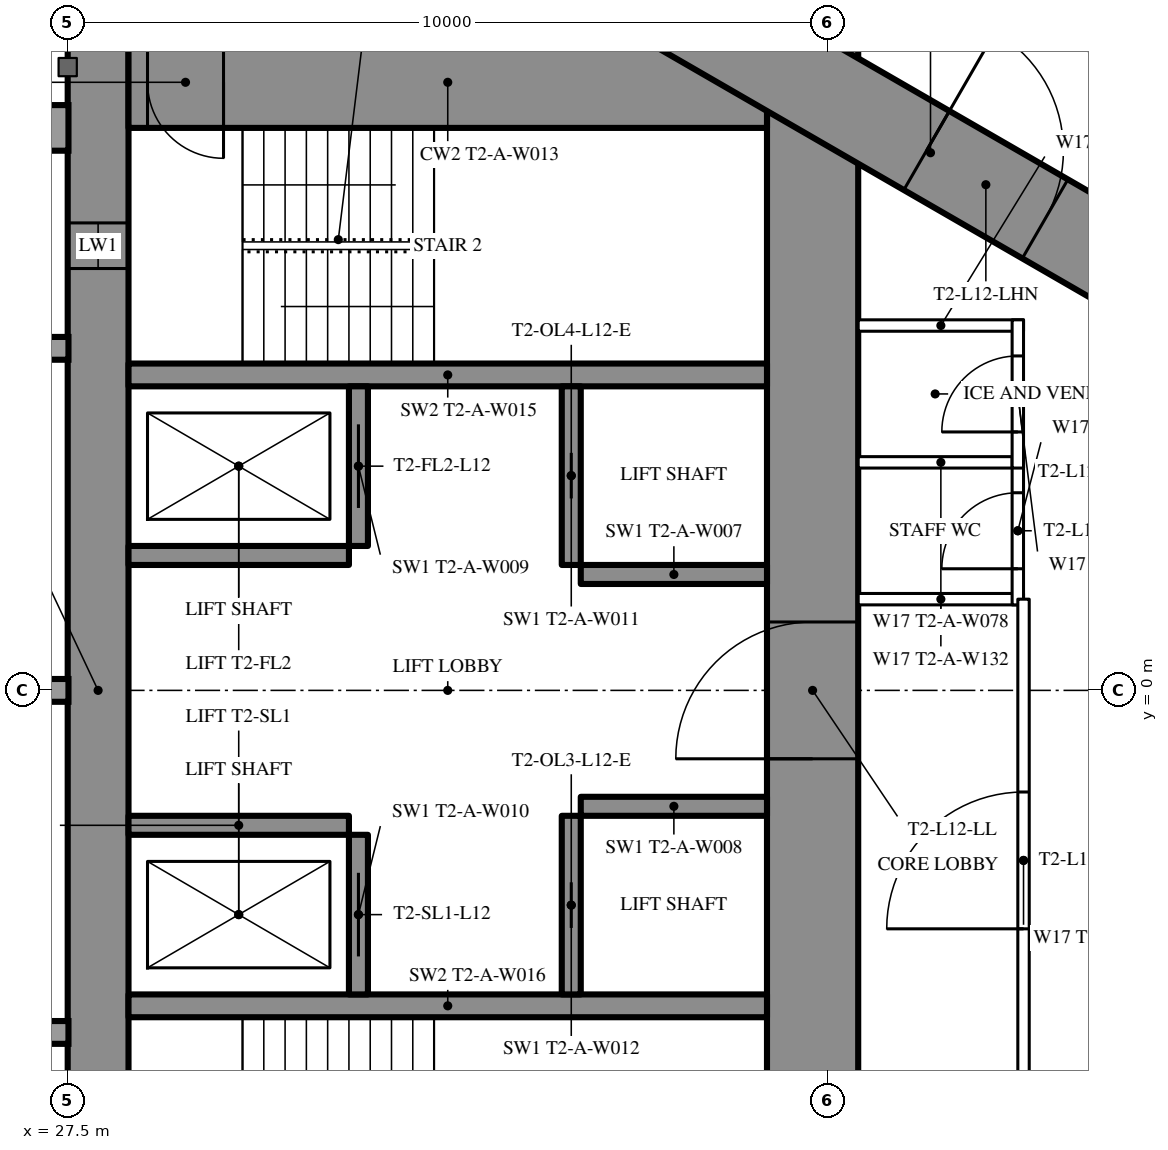
"""IFC4 building model, lengths in metres.
Left out: names, types, materials, properties, quantities, classifications, styles, units other than length and angle.
Written with IfcOpenShell. Run it as: python <this file> out.ifc"""

import sys

from ifc_helpers import new_model, si_unit, direction, frame, frame_2d, origin, place, context, subcontext, project, spatial, rectangle, extrude, element, fill, save


model = new_model("IFC4")
c1 = context("Model", 3, precision=1e-05, world=origin(), true_north=direction((0.0, 1.0)))
c2 = subcontext(c1, "Body", "Model", "MODEL_VIEW")
j1 = project(units=[si_unit("LENGTHUNIT", "METRE"), si_unit("PLANEANGLEUNIT", "RADIAN")], contexts=[c1])
p1 = place(None, origin())
s1 = spatial("IfcSite", under=j1, at=p1, CompositionType="ELEMENT")
p2 = place(p1, origin())
s2 = spatial("IfcBuilding", under=s1, at=p2, CompositionType="ELEMENT")
p3 = place(p2, frame((0.0, 0.0, 49.5)))
s3 = spatial("IfcBuildingStorey", under=s2, at=p3, CompositionType="ELEMENT", Elevation=49.5)
p4 = place(p3, frame((27.9, -8.6, 0.0), z_axis=(0.0, 0.0, 1.0), x_axis=(0.0, 1.0, 0.0)))
e1 = element("IfcWall", 1, at=p4, inside=s3, PredefinedType="SHEAR", context=c2, shape_type="SweptSolid", body=[
    extrude(rectangle(XDim=17.2, YDim=0.8, at=frame_2d((8.6, 0.0))), origin(), (0.0, 0.0, 1.0), 3.5),
])
p5 = place(p4, frame((2.45, 0.0, 0.6)))
e2 = element("IfcOpeningElement", 2, at=p5, cuts=e1, PredefinedType="OPENING", context=c2, shape_type="SweptSolid", body=[
    extrude(rectangle(XDim=0.6, YDim=2.1, at=frame_2d((0.3, 1.05))), frame((0.0, 0.41, 0.0), z_axis=(0.0, -1.0, 0.0), x_axis=(1.0, 0.0, 0.0)), (0.0, 0.0, 1.0), 0.82),
])
p6 = place(p4, frame((14.15, 0.0, 0.6)))
e3 = element("IfcOpeningElement", 3, at=p6, cuts=e1, PredefinedType="OPENING", context=c2, shape_type="SweptSolid", body=[
    extrude(rectangle(XDim=0.6, YDim=2.1, at=frame_2d((0.3, 1.05))), frame((0.0, 0.41, 0.0), z_axis=(0.0, -1.0, 0.0), x_axis=(1.0, 0.0, 0.0)), (0.0, 0.0, 1.0), 0.82),
])
p7 = place(p3, frame((37.3, -8.6, 0.0), z_axis=(0.0, 0.0, 1.0), x_axis=(0.0, 1.0, 0.0)))
e4 = element("IfcWall", 4, at=p7, inside=s3, PredefinedType="SHEAR", context=c2, shape_type="SweptSolid", body=[
    extrude(rectangle(XDim=17.2, YDim=1.2, at=frame_2d((8.6, 0.0))), origin(), (0.0, 0.0, 1.0), 3.5),
])
p8 = place(p7, frame((7.7, 0.0, 0.0)))
e5 = element("IfcOpeningElement", 5, at=p8, cuts=e4, PredefinedType="OPENING", context=c2, shape_type="SweptSolid", body=[
    extrude(rectangle(XDim=1.8, YDim=2.2, at=frame_2d((0.9, 1.1))), frame((0.0, 0.61, 0.0), z_axis=(0.0, -1.0, 0.0), x_axis=(1.0, 0.0, 0.0)), (0.0, 0.0, 1.0), 1.22),
])
p9 = place(p3, frame((28.3, 8.0, 0.0), z_axis=(0.0, 0.0, 1.0), x_axis=(1.0, 0.0, 0.0)))
e6 = element("IfcWall", 6, at=p9, inside=s3, PredefinedType="SHEAR", context=c2, shape_type="SweptSolid", body=[
    extrude(rectangle(XDim=8.4, YDim=1.2, at=frame_2d((4.2, 0.0))), origin(), (0.0, 0.0, 1.0), 3.5),
])
p10 = place(p9, frame((0.25, 0.0, 0.0)))
e7 = element("IfcOpeningElement", 7, at=p10, cuts=e6, PredefinedType="OPENING", context=c2, shape_type="SweptSolid", body=[
    extrude(rectangle(XDim=1.0, YDim=2.2, at=frame_2d((0.5, 1.1))), frame((0.0, 0.61, 0.0), z_axis=(0.0, -1.0, 0.0), x_axis=(1.0, 0.0, 0.0)), (0.0, 0.0, 1.0), 1.22),
])
for number, where, z_axis, x_axis in (
    (8, (28.3, -4.15, 0.0), (0.0, 0.0, 1.0), (1.0, 0.0, 0.0)),
    (9, (28.3, 4.15, 0.0), (0.0, 0.0, 1.0), (1.0, 0.0, 0.0)),
):
    element("IfcWall", number, at=place(p3, frame(where, z_axis=z_axis, x_axis=x_axis)), inside=s3, PredefinedType="SHEAR", context=c2, shape_type="SweptSolid", body=[
        extrude(rectangle(XDim=8.4, YDim=0.3, at=frame_2d((4.2, 0.0))), origin(), (0.0, 0.0, 1.0), 3.5),
    ])
p11 = place(p3, frame((31.325, -4.0, 0.0), z_axis=(0.0, 0.0, 1.0), x_axis=(0.0, 1.0, 0.0)))
e10 = element("IfcWall", 10, at=p11, inside=s3, PredefinedType="SHEAR", context=c2, shape_type="SweptSolid", body=[
    extrude(rectangle(XDim=2.1, YDim=0.25, at=frame_2d((1.05, 0.0))), origin(), (0.0, 0.0, 1.0), 3.5),
])
p12 = place(p11, frame((0.5, 0.0, 0.0)))
e11 = element("IfcOpeningElement", 11, at=p12, cuts=e10, PredefinedType="OPENING", context=c2, shape_type="SweptSolid", body=[
    extrude(rectangle(XDim=1.1, YDim=2.2, at=frame_2d((0.55, 1.1))), frame((0.0, 0.135, 0.0), z_axis=(0.0, -1.0, 0.0), x_axis=(1.0, 0.0, 0.0)), (0.0, 0.0, 1.0), 0.27),
])
p13 = place(p3, frame((34.125, -4.0, 0.0), z_axis=(0.0, 0.0, 1.0), x_axis=(0.0, 1.0, 0.0)))
e12 = element("IfcWall", 12, at=p13, inside=s3, PredefinedType="SHEAR", context=c2, shape_type="SweptSolid", body=[
    extrude(rectangle(XDim=2.35, YDim=0.25, at=frame_2d((1.175, 0.0))), origin(), (0.0, 0.0, 1.0), 3.5),
])
p14 = place(p13, frame((0.875, 0.0, 0.0)))
e13 = element("IfcOpeningElement", 13, at=p14, cuts=e12, PredefinedType="OPENING", context=c2, shape_type="SweptSolid", body=[
    extrude(rectangle(XDim=0.6, YDim=2.0, at=frame_2d((0.3, 1.0))), frame((0.0, 0.135, 0.0), z_axis=(0.0, -1.0, 0.0), x_axis=(1.0, 0.0, 0.0)), (0.0, 0.0, 1.0), 0.27),
])
p15 = place(p3, frame((28.3, -1.775, 0.0), z_axis=(0.0, 0.0, 1.0), x_axis=(1.0, 0.0, 0.0)))
e14 = element("IfcWall", 14, at=p15, inside=s3, PredefinedType="SHEAR", context=c2, shape_type="SweptSolid", body=[
    extrude(rectangle(XDim=2.9, YDim=0.25, at=frame_2d((1.45, 0.0))), origin(), (0.0, 0.0, 1.0), 3.5),
])
p16 = place(p3, frame((34.25, -1.525, 0.0), z_axis=(0.0, 0.0, 1.0), x_axis=(1.0, 0.0, 0.0)))
e15 = element("IfcWall", 15, at=p16, inside=s3, PredefinedType="SHEAR", context=c2, shape_type="SweptSolid", body=[
    extrude(rectangle(XDim=2.45, YDim=0.25, at=frame_2d((1.225, 0.0))), origin(), (0.0, 0.0, 1.0), 3.5),
])
p17 = place(p3, frame((31.325, 1.9, 0.0), z_axis=(0.0, 0.0, 1.0), x_axis=(0.0, 1.0, 0.0)))
e16 = element("IfcWall", 16, at=p17, inside=s3, PredefinedType="SHEAR", context=c2, shape_type="SweptSolid", body=[
    extrude(rectangle(XDim=2.1, YDim=0.25, at=frame_2d((1.05, 0.0))), origin(), (0.0, 0.0, 1.0), 3.5),
])
p18 = place(p17, frame((0.5, 0.0, 0.0)))
e17 = element("IfcOpeningElement", 17, at=p18, cuts=e16, PredefinedType="OPENING", context=c2, shape_type="SweptSolid", body=[
    extrude(rectangle(XDim=1.1, YDim=2.2, at=frame_2d((0.55, 1.1))), frame((0.0, 0.135, 0.0), z_axis=(0.0, -1.0, 0.0), x_axis=(1.0, 0.0, 0.0)), (0.0, 0.0, 1.0), 0.27),
])
p19 = place(p3, frame((34.125, 1.65, 0.0), z_axis=(0.0, 0.0, 1.0), x_axis=(0.0, 1.0, 0.0)))
e18 = element("IfcWall", 18, at=p19, inside=s3, PredefinedType="SHEAR", context=c2, shape_type="SweptSolid", body=[
    extrude(rectangle(XDim=2.35, YDim=0.25, at=frame_2d((1.175, 0.0))), origin(), (0.0, 0.0, 1.0), 3.5),
])
p20 = place(p19, frame((0.875, 0.0, 0.0)))
e19 = element("IfcOpeningElement", 19, at=p20, cuts=e18, PredefinedType="OPENING", context=c2, shape_type="SweptSolid", body=[
    extrude(rectangle(XDim=0.6, YDim=2.0, at=frame_2d((0.3, 1.0))), frame((0.0, 0.135, 0.0), z_axis=(0.0, -1.0, 0.0), x_axis=(1.0, 0.0, 0.0)), (0.0, 0.0, 1.0), 0.27),
])
p21 = place(p3, frame((28.3, 1.775, 0.0), z_axis=(0.0, 0.0, 1.0), x_axis=(1.0, 0.0, 0.0)))
e20 = element("IfcWall", 20, at=p21, inside=s3, PredefinedType="SHEAR", context=c2, shape_type="SweptSolid", body=[
    extrude(rectangle(XDim=2.9, YDim=0.25, at=frame_2d((1.45, 0.0))), origin(), (0.0, 0.0, 1.0), 3.5),
])
p22 = place(p3, frame((34.25, 1.525, 0.0), z_axis=(0.0, 0.0, 1.0), x_axis=(1.0, 0.0, 0.0)))
e21 = element("IfcWall", 21, at=p22, inside=s3, PredefinedType="SHEAR", context=c2, shape_type="SweptSolid", body=[
    extrude(rectangle(XDim=2.45, YDim=0.25, at=frame_2d((1.225, 0.0))), origin(), (0.0, 0.0, 1.0), 3.5),
])
p23 = place(p3, frame((27.2, -13.8, 0.0), z_axis=(0.0, 0.0, 1.0), x_axis=(0.866027159892, 0.499996958321, 0.0)))
e22 = element("IfcWall", 22, at=p23, inside=s3, PredefinedType="SHEAR", context=c2, shape_type="SweptSolid", body=[
    extrude(rectangle(XDim=27.947, YDim=1.2, at=frame_2d((13.973, 0.0))), origin(), (0.0, 0.0, 1.0), 3.5),
])
p24 = place(p23, frame((4.6, 0.0, 0.0)))
e23 = element("IfcOpeningElement", 23, at=p24, cuts=e22, PredefinedType="OPENING", context=c2, shape_type="SweptSolid", body=[
    extrude(rectangle(XDim=1.0, YDim=2.2, at=frame_2d((0.5, 1.1))), frame((0.0, 0.61, 0.0), z_axis=(0.0, -1.0, 0.0), x_axis=(1.0, 0.0, 0.0)), (0.0, 0.0, 1.0), 1.22),
])
p25 = place(p23, frame((13.395, 0.0, 0.0)))
e24 = element("IfcOpeningElement", 24, at=p25, cuts=e22, PredefinedType="OPENING", context=c2, shape_type="SweptSolid", body=[
    extrude(rectangle(XDim=1.8, YDim=2.2, at=frame_2d((0.9, 1.1))), frame((0.0, 0.61, 0.0), z_axis=(0.0, -1.0, 0.0), x_axis=(1.0, 0.0, 0.0)), (0.0, 0.0, 1.0), 1.22),
])
p26 = place(p3, frame((27.2, 13.8, 0.0), z_axis=(0.0, 0.0, 1.0), x_axis=(0.866024515034, -0.500001539357, 0.0)))
e25 = element("IfcWall", 25, at=p26, inside=s3, PredefinedType="SHEAR", context=c2, shape_type="SweptSolid", body=[
    extrude(rectangle(XDim=26.907, YDim=1.2, at=frame_2d((13.454, 0.0))), origin(), (0.0, 0.0, 1.0), 3.5),
])
p27 = place(p26, frame((4.6, 0.0, 0.0)))
e26 = element("IfcOpeningElement", 26, at=p27, cuts=e25, PredefinedType="OPENING", context=c2, shape_type="SweptSolid", body=[
    extrude(rectangle(XDim=1.0, YDim=2.2, at=frame_2d((0.5, 1.1))), frame((0.0, 0.61, 0.0), z_axis=(0.0, -1.0, 0.0), x_axis=(1.0, 0.0, 0.0)), (0.0, 0.0, 1.0), 1.22),
])
p28 = place(p26, frame((13.395, 0.0, 0.0)))
e27 = element("IfcOpeningElement", 27, at=p28, cuts=e25, PredefinedType="OPENING", context=c2, shape_type="SweptSolid", body=[
    extrude(rectangle(XDim=1.8, YDim=2.2, at=frame_2d((0.9, 1.1))), frame((0.0, 0.61, 0.0), z_axis=(0.0, -1.0, 0.0), x_axis=(1.0, 0.0, 0.0)), (0.0, 0.0, 1.0), 1.22),
])
p29 = place(p3, frame((37.96, -10.243, 0.0), z_axis=(0.0, 0.0, 1.0), x_axis=(0.866026429433, 0.499998223521, 0.0)))
e28 = element("IfcWall", 28, at=p29, inside=s3, PredefinedType="PARTITIONING", context=c2, shape_type="SweptSolid", body=[
    extrude(rectangle(XDim=20.487, YDim=0.2, at=frame_2d((10.243, 0.0))), origin(), (0.0, 0.0, 1.0), 3.25),
])
p30 = place(p29, frame((6.925, 0.0, 0.0)))
e29 = element("IfcOpeningElement", 29, at=p30, cuts=e28, PredefinedType="OPENING", context=c2, shape_type="SweptSolid", body=[
    extrude(rectangle(XDim=0.95, YDim=2.2, at=frame_2d((0.475, 1.1))), frame((0.0, 0.11, 0.0), z_axis=(0.0, -1.0, 0.0), x_axis=(1.0, 0.0, 0.0)), (0.0, 0.0, 1.0), 0.22),
])
p31 = place(p29, frame((11.549, 0.0, 0.0)))
e30 = element("IfcOpeningElement", 30, at=p31, cuts=e28, PredefinedType="OPENING", context=c2, shape_type="SweptSolid", body=[
    extrude(rectangle(XDim=0.95, YDim=2.2, at=frame_2d((0.475, 1.1))), frame((0.0, 0.11, 0.0), z_axis=(0.0, -1.0, 0.0), x_axis=(1.0, 0.0, 0.0)), (0.0, 0.0, 1.0), 0.22),
])
p32 = place(p29, frame((13.249, 0.0, 0.0)))
e31 = element("IfcOpeningElement", 31, at=p32, cuts=e28, PredefinedType="OPENING", context=c2, shape_type="SweptSolid", body=[
    extrude(rectangle(XDim=0.95, YDim=2.2, at=frame_2d((0.475, 1.1))), frame((0.0, 0.11, 0.0), z_axis=(0.0, -1.0, 0.0), x_axis=(1.0, 0.0, 0.0)), (0.0, 0.0, 1.0), 0.22),
])
p33 = place(p29, frame((17.585, 0.0, 0.0)))
e32 = element("IfcOpeningElement", 32, at=p33, cuts=e28, PredefinedType="OPENING", context=c2, shape_type="SweptSolid", body=[
    extrude(rectangle(XDim=0.95, YDim=2.2, at=frame_2d((0.475, 1.1))), frame((0.0, 0.11, 0.0), z_axis=(0.0, -1.0, 0.0), x_axis=(1.0, 0.0, 0.0)), (0.0, 0.0, 1.0), 0.22),
])
p34 = place(p29, frame((0.6, 0.0, 0.0)))
e33 = element("IfcOpeningElement", 33, at=p34, cuts=e28, PredefinedType="OPENING", context=c2, shape_type="SweptSolid", body=[
    extrude(rectangle(XDim=0.95, YDim=2.2, at=frame_2d((0.475, 1.1))), frame((0.0, 0.11, 0.0), z_axis=(0.0, -1.0, 0.0), x_axis=(1.0, 0.0, 0.0)), (0.0, 0.0, 1.0), 0.22),
])
p35 = place(p3, frame((36.834, 10.894, 0.0), z_axis=(0.0, 0.0, 1.0), x_axis=(0.866031136856, -0.499990069898, 0.0)))
e34 = element("IfcWall", 34, at=p35, inside=s3, PredefinedType="PARTITIONING", context=c2, shape_type="SweptSolid", body=[
    extrude(rectangle(XDim=5.475, YDim=0.2, at=frame_2d((2.738, 0.0))), origin(), (0.0, 0.0, 1.0), 3.25),
])
p36 = place(p35, frame((1.542, 0.0, 0.0)))
e35 = element("IfcOpeningElement", 35, at=p36, cuts=e34, PredefinedType="OPENING", context=c2, shape_type="SweptSolid", body=[
    extrude(rectangle(XDim=0.95, YDim=2.2, at=frame_2d((0.475, 1.1))), frame((0.0, 0.11, 0.0), z_axis=(0.0, -1.0, 0.0), x_axis=(1.0, 0.0, 0.0)), (0.0, 0.0, 1.0), 0.22),
])
p37 = place(p35, frame((0.246, 0.0, 0.0)))
e36 = element("IfcOpeningElement", 36, at=p37, cuts=e34, PredefinedType="OPENING", context=c2, shape_type="SweptSolid", body=[
    extrude(rectangle(XDim=0.9, YDim=2.2, at=frame_2d((0.45, 1.1))), frame((0.0, 0.11, 0.0), z_axis=(0.0, -1.0, 0.0), x_axis=(1.0, 0.0, 0.0)), (0.0, 0.0, 1.0), 0.22),
])
for number, where, z_axis, x_axis in (
    (37, (37.9, 1.2, 0.0), (0.0, 0.0, 1.0), (1.0, 0.0, 0.0)),
    (38, (37.9, 3.0, 0.0), (0.0, 0.0, 1.0), (1.0, 0.0, 0.0)),
    (39, (37.9, 4.8, 0.0), (0.0, 0.0, 1.0), (1.0, 0.0, 0.0)),
):
    element("IfcWall", number, at=place(p3, frame(where, z_axis=z_axis, x_axis=x_axis)), inside=s3, PredefinedType="PARTITIONING", context=c2, shape_type="SweptSolid", body=[
        extrude(rectangle(XDim=2.175, YDim=0.15, at=frame_2d((1.087, 0.0))), origin(), (0.0, 0.0, 1.0), 3.25),
    ])
p38 = place(p3, frame((40.0, 1.125, 0.0), z_axis=(0.0, 0.0, 1.0), x_axis=(0.0, 1.0, 0.0)))
e40 = element("IfcWall", 40, at=p38, inside=s3, PredefinedType="PARTITIONING", context=c2, shape_type="SweptSolid", body=[
    extrude(rectangle(XDim=1.95, YDim=0.15, at=frame_2d((0.975, 0.0))), origin(), (0.0, 0.0, 1.0), 3.25),
])
p39 = place(p38, frame((0.475, 0.0, 0.0)))
e41 = element("IfcOpeningElement", 41, at=p39, cuts=e40, PredefinedType="OPENING", context=c2, shape_type="SweptSolid", body=[
    extrude(rectangle(XDim=1.0, YDim=2.2, at=frame_2d((0.5, 1.1))), frame((0.0, 0.085, 0.0), z_axis=(0.0, -1.0, 0.0), x_axis=(1.0, 0.0, 0.0)), (0.0, 0.0, 1.0), 0.17),
])
p40 = place(p3, frame((40.0, 2.925, 0.0), z_axis=(0.0, 0.0, 1.0), x_axis=(0.0, 1.0, 0.0)))
e42 = element("IfcWall", 42, at=p40, inside=s3, PredefinedType="PARTITIONING", context=c2, shape_type="SweptSolid", body=[
    extrude(rectangle(XDim=1.95, YDim=0.15, at=frame_2d((0.975, 0.0))), origin(), (0.0, 0.0, 1.0), 3.25),
])
p41 = place(p40, frame((0.475, 0.0, 0.0)))
e43 = element("IfcOpeningElement", 43, at=p41, cuts=e42, PredefinedType="OPENING", context=c2, shape_type="SweptSolid", body=[
    extrude(rectangle(XDim=1.0, YDim=2.2, at=frame_2d((0.5, 1.1))), frame((0.0, 0.085, 0.0), z_axis=(0.0, -1.0, 0.0), x_axis=(1.0, 0.0, 0.0)), (0.0, 0.0, 1.0), 0.17),
])
p42 = place(p3, frame((40.075, -5.674, 0.0), z_axis=(0.0, 0.0, 1.0), x_axis=(0.0, 1.0, 0.0)))
e44 = element("IfcWall", 44, at=p42, inside=s3, PredefinedType="PARTITIONING", context=c2, shape_type="SweptSolid", body=[
    extrude(rectangle(XDim=6.874, YDim=0.15, at=frame_2d((3.437, 0.0))), origin(), (0.0, 0.0, 1.0), 3.25),
])
p43 = place(p42, frame((2.537, 0.0, 0.0)))
e45 = element("IfcOpeningElement", 45, at=p43, cuts=e44, PredefinedType="OPENING", context=c2, shape_type="SweptSolid", body=[
    extrude(rectangle(XDim=1.8, YDim=2.2, at=frame_2d((0.9, 1.1))), frame((0.0, 0.085, 0.0), z_axis=(0.0, -1.0, 0.0), x_axis=(1.0, 0.0, 0.0)), (0.0, 0.0, 1.0), 0.17),
])
p44 = place(p39, origin())
e46 = element("IfcDoor", 46, at=p44, inside=s3, OperationType="SINGLE_SWING_LEFT", PredefinedType="DOOR", context=c2, shape_type="SweptSolid", body=[
    extrude(rectangle(XDim=1.0, YDim=2.2, at=frame_2d((0.5, 1.1))), frame((0.0, 0.025, 0.0), z_axis=(0.0, -1.0, 0.0), x_axis=(1.0, 0.0, 0.0)), (0.0, 0.0, 1.0), 0.05),
])
fill(e41, e46)
p45 = place(p41, origin())
e47 = element("IfcDoor", 47, at=p45, inside=s3, OperationType="SINGLE_SWING_LEFT", PredefinedType="DOOR", context=c2, shape_type="SweptSolid", body=[
    extrude(rectangle(XDim=1.0, YDim=2.2, at=frame_2d((0.5, 1.1))), frame((0.0, 0.025, 0.0), z_axis=(0.0, -1.0, 0.0), x_axis=(1.0, 0.0, 0.0)), (0.0, 0.0, 1.0), 0.05),
])
fill(e43, e47)
p46 = place(p43, origin())
e48 = element("IfcDoor", 48, at=p46, inside=s3, OperationType="DOUBLE_DOOR_SINGLE_SWING", PredefinedType="DOOR", context=c2, shape_type="SweptSolid", body=[
    extrude(rectangle(XDim=1.8, YDim=2.2, at=frame_2d((0.9, 1.1))), frame((0.0, 0.025, 0.0), z_axis=(0.0, -1.0, 0.0), x_axis=(1.0, 0.0, 0.0)), (0.0, 0.0, 1.0), 0.05),
])
fill(e45, e48)
p47 = place(p28, origin())
e49 = element("IfcDoor", 49, at=p47, inside=s3, OperationType="DOUBLE_DOOR_SINGLE_SWING", PredefinedType="DOOR", context=c2, shape_type="SweptSolid", body=[
    extrude(rectangle(XDim=1.8, YDim=2.2, at=frame_2d((0.9, 1.1))), frame((0.0, 0.025, 0.0), z_axis=(0.0, -1.0, 0.0), x_axis=(1.0, 0.0, 0.0)), (0.0, 0.0, 1.0), 0.05),
])
fill(e27, e49)
p48 = place(p8, origin())
e50 = element("IfcDoor", 50, at=p48, inside=s3, OperationType="DOUBLE_DOOR_SINGLE_SWING", PredefinedType="DOOR", context=c2, shape_type="SweptSolid", body=[
    extrude(rectangle(XDim=1.8, YDim=2.2, at=frame_2d((0.9, 1.1))), frame((0.0, 0.025, 0.0), z_axis=(0.0, -1.0, 0.0), x_axis=(1.0, 0.0, 0.0)), (0.0, 0.0, 1.0), 0.05),
])
fill(e5, e50)
p49 = place(p10, origin())
e51 = element("IfcDoor", 51, at=p49, inside=s3, OperationType="SINGLE_SWING_RIGHT", PredefinedType="DOOR", context=c2, shape_type="SweptSolid", body=[
    extrude(rectangle(XDim=1.0, YDim=2.2, at=frame_2d((0.5, 1.1))), frame((0.0, 0.025, 0.0), z_axis=(0.0, -1.0, 0.0), x_axis=(1.0, 0.0, 0.0)), (0.0, 0.0, 1.0), 0.05),
])
fill(e7, e51)
p50 = place(p12, origin())
e52 = element("IfcDoor", 52, at=p50, inside=s3, OperationType="SLIDING_TO_LEFT", PredefinedType="USERDEFINED", context=c2, shape_type="SweptSolid", body=[
    extrude(rectangle(XDim=1.1, YDim=2.2, at=frame_2d((0.55, 1.1))), frame((0.0, 0.025, 0.0), z_axis=(0.0, -1.0, 0.0), x_axis=(1.0, 0.0, 0.0)), (0.0, 0.0, 1.0), 0.05),
])
fill(e11, e52)
p51 = place(p18, origin())
e53 = element("IfcDoor", 53, at=p51, inside=s3, OperationType="SLIDING_TO_LEFT", PredefinedType="USERDEFINED", context=c2, shape_type="SweptSolid", body=[
    extrude(rectangle(XDim=1.1, YDim=2.2, at=frame_2d((0.55, 1.1))), frame((0.0, 0.025, 0.0), z_axis=(0.0, -1.0, 0.0), x_axis=(1.0, 0.0, 0.0)), (0.0, 0.0, 1.0), 0.05),
])
fill(e17, e53)
p52 = place(p14, origin())
e54 = element("IfcDoor", 54, at=p52, inside=s3, OperationType="SLIDING_TO_LEFT", PredefinedType="DOOR", context=c2, shape_type="SweptSolid", body=[
    extrude(rectangle(XDim=0.6, YDim=2.0, at=frame_2d((0.3, 1.0))), frame((0.0, 0.025, 0.0), z_axis=(0.0, -1.0, 0.0), x_axis=(1.0, 0.0, 0.0)), (0.0, 0.0, 1.0), 0.05),
])
fill(e13, e54)
p53 = place(p20, origin())
e55 = element("IfcDoor", 55, at=p53, inside=s3, OperationType="SLIDING_TO_LEFT", PredefinedType="DOOR", context=c2, shape_type="SweptSolid", body=[
    extrude(rectangle(XDim=0.6, YDim=2.0, at=frame_2d((0.3, 1.0))), frame((0.0, 0.025, 0.0), z_axis=(0.0, -1.0, 0.0), x_axis=(1.0, 0.0, 0.0)), (0.0, 0.0, 1.0), 0.05),
])
fill(e19, e55)
p54 = place(p6, origin())
e56 = element("IfcWindow", 56, at=p54, inside=s3, PartitioningType="SINGLE_PANEL", PredefinedType="WINDOW", context=c2, shape_type="SweptSolid", body=[
    extrude(rectangle(XDim=0.6, YDim=2.1, at=frame_2d((0.3, 1.05))), frame((0.0, 0.03, 0.0), z_axis=(0.0, -1.0, 0.0), x_axis=(1.0, 0.0, 0.0)), (0.0, 0.0, 1.0), 0.06),
])
fill(e3, e56)
save(model, sys.argv[1])
